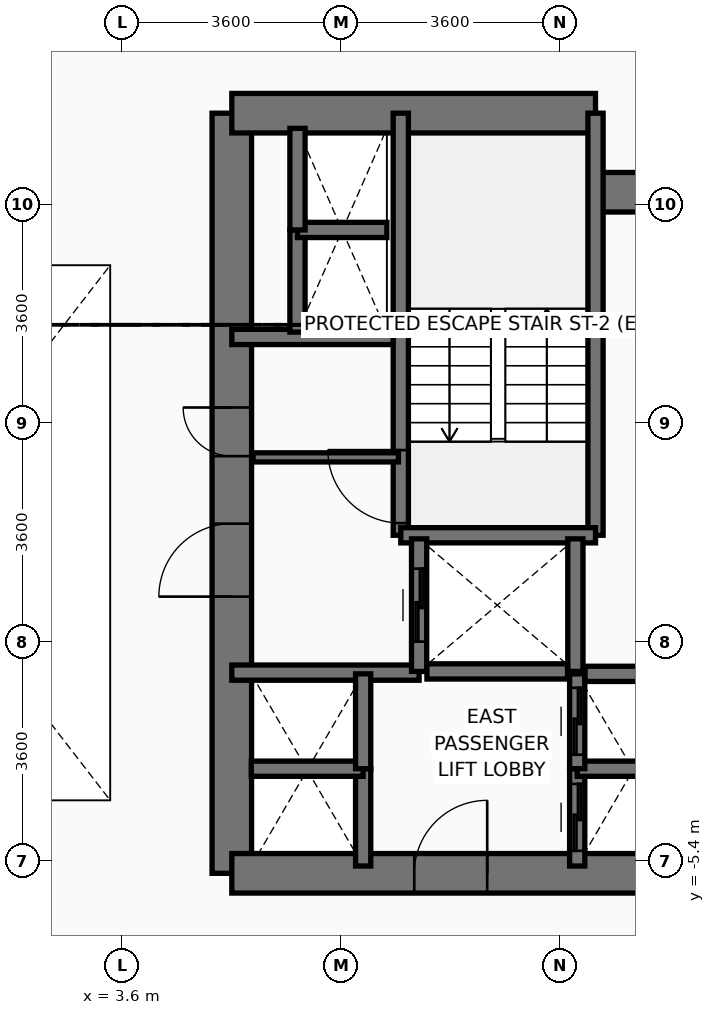
"""IFC4 building model, lengths in metres.
Left out: names, types, materials, properties, quantities, classifications, styles, units other than length and angle.
Written with IfcOpenShell. Run it as: python <this file> out.ifc"""

import sys

from ifc_helpers import new_model, si_unit, direction, frame, frame_2d, origin, place, context, subcontext, project, spatial, rectangle, extrude, source, transform, mapped, element, fill, save


model = new_model("IFC4")
c1 = context("Model", 3, precision=1e-05, world=origin(), true_north=direction((0.0, 1.0)))
c2 = subcontext(c1, "Body", "Model", "MODEL_VIEW")
j1 = project(units=[si_unit("LENGTHUNIT", "METRE"), si_unit("PLANEANGLEUNIT", "RADIAN")], contexts=[c1])
p1 = place(None, origin())
s1 = spatial("IfcSite", under=j1, at=p1, CompositionType="ELEMENT")
p2 = place(p1, origin())
s2 = spatial("IfcBuilding", under=s1, at=p2, CompositionType="ELEMENT")
p3 = place(p2, frame((0.0, 0.0, 10.2)))
s3 = spatial("IfcBuildingStorey", under=s2, at=p3, CompositionType="ELEMENT", Elevation=10.2)
p4 = place(p3, frame((5.4, -5.6, 0.0), z_axis=(0.0, 0.0, 1.0), x_axis=(0.0, 1.0, 0.0)))
e1 = element("IfcWall", 1, at=p4, inside=s3, PredefinedType="SHEAR", context=c2, shape_type="SweptSolid", body=[
    extrude(rectangle(XDim=12.5, YDim=0.65, at=frame_2d((6.25, 0.0))), origin(), (0.0, 0.0, 1.0), 5.15),
])
p5 = place(p4, frame((4.55, 0.0, 0.0)))
e2 = element("IfcOpeningElement", 2, at=p5, cuts=e1, PredefinedType="OPENING", context=c2, shape_type="SweptSolid", body=[
    extrude(rectangle(XDim=1.2, YDim=2.2, at=frame_2d((0.6, 1.1))), frame((0.0, 0.335, 0.0), z_axis=(0.0, -1.0, 0.0), x_axis=(1.0, 0.0, 0.0)), (0.0, 0.0, 1.0), 0.67),
])
p6 = place(p4, frame((6.86, 0.0, 0.0)))
e3 = element("IfcOpeningElement", 3, at=p6, cuts=e1, PredefinedType="OPENING", context=c2, shape_type="SweptSolid", body=[
    extrude(rectangle(XDim=0.8, YDim=2.1, at=frame_2d((0.4, 1.05))), frame((0.0, 0.335, 0.0), z_axis=(0.0, -1.0, 0.0), x_axis=(1.0, 0.0, 0.0)), (0.0, 0.0, 1.0), 0.67),
])
p7 = place(p3, frame((5.4, 6.9, 0.0), z_axis=(0.0, 0.0, 1.0), x_axis=(1.0, 0.0, 0.0)))
e4 = element("IfcWall", 4, at=p7, inside=s3, PredefinedType="SHEAR", context=c2, shape_type="SweptSolid", body=[
    extrude(rectangle(XDim=5.981, YDim=0.65, at=frame_2d((2.991, 0.0))), origin(), (0.0, 0.0, 1.0), 5.15),
])
p8 = place(p3, frame((11.381, 5.6, 0.0), z_axis=(0.0, 0.0, 1.0), x_axis=(1.0, 0.0, 0.0)))
e5 = element("IfcWall", 5, at=p8, inside=s3, PredefinedType="SHEAR", context=c2, shape_type="SweptSolid", body=[
    extrude(rectangle(XDim=1.819, YDim=0.65, at=frame_2d((0.909, 0.0))), origin(), (0.0, 0.0, 1.0), 5.15),
])
p9 = place(p3, frame((5.4, -5.6, 0.0), z_axis=(0.0, 0.0, 1.0), x_axis=(1.0, 0.0, 0.0)))
e6 = element("IfcWall", 6, at=p9, inside=s3, PredefinedType="SHEAR", context=c2, shape_type="SweptSolid", body=[
    extrude(rectangle(XDim=7.8, YDim=0.65, at=frame_2d((3.9, 0.0))), origin(), (0.0, 0.0, 1.0), 5.15),
])
p10 = place(p9, frame((3.0, 0.0, 0.0)))
e7 = element("IfcOpeningElement", 7, at=p10, cuts=e6, PredefinedType="OPENING", context=c2, shape_type="SweptSolid", body=[
    extrude(rectangle(XDim=1.2, YDim=2.2, at=frame_2d((0.6, 1.1))), frame((0.0, 0.335, 0.0), z_axis=(0.0, -1.0, 0.0), x_axis=(1.0, 0.0, 0.0)), (0.0, 0.0, 1.0), 0.67),
])
p11 = place(p3, frame((5.4, 3.22, 0.0), z_axis=(0.0, 0.0, 1.0), x_axis=(1.0, 0.0, 0.0)))
e8 = element("IfcWall", 8, at=p11, inside=s3, PredefinedType="SOLIDWALL", context=c2, shape_type="SweptSolid", body=[
    extrude(rectangle(XDim=2.78, YDim=0.25, at=frame_2d((1.39, 0.0))), origin(), (0.0, 0.0, 1.0), 5.15),
])
p12 = place(p3, frame((5.4, -2.3, 0.0), z_axis=(0.0, 0.0, 1.0), x_axis=(1.0, 0.0, 0.0)))
e9 = element("IfcWall", 9, at=p12, inside=s3, PredefinedType="SOLIDWALL", context=c2, shape_type="SweptSolid", body=[
    extrude(rectangle(XDim=3.08, YDim=0.25, at=frame_2d((1.54, 0.0))), origin(), (0.0, 0.0, 1.0), 5.15),
])
p13 = place(p3, frame((8.179, -0.041, 0.0), z_axis=(0.0, 0.0, 1.0), x_axis=(0.0, 1.0, 0.0)))
e10 = element("IfcWall", 10, at=p13, inside=s3, PredefinedType="SOLIDWALL", context=c2, shape_type="SweptSolid", body=[
    extrude(rectangle(XDim=6.941, YDim=0.25, at=frame_2d((3.47, 0.0))), origin(), (0.0, 0.0, 1.0), 5.15),
])
p14 = place(p13, frame((0.2, 0.0, 0.0)))
e11 = element("IfcOpeningElement", 11, at=p14, cuts=e10, PredefinedType="OPENING", context=c2, shape_type="SweptSolid", body=[
    extrude(rectangle(XDim=1.2, YDim=2.2, at=frame_2d((0.6, 1.1))), frame((0.0, 0.135, 0.0), z_axis=(0.0, -1.0, 0.0), x_axis=(1.0, 0.0, 0.0)), (0.0, 0.0, 1.0), 0.27),
])
p15 = place(p3, frame((11.381, -0.041, 0.0), z_axis=(0.0, 0.0, 1.0), x_axis=(0.0, 1.0, 0.0)))
e12 = element("IfcWall", 12, at=p15, inside=s3, PredefinedType="SOLIDWALL", context=c2, shape_type="SweptSolid", body=[
    extrude(rectangle(XDim=6.941, YDim=0.25, at=frame_2d((3.47, 0.0))), origin(), (0.0, 0.0, 1.0), 5.15),
])
p16 = place(p3, frame((8.179, -0.041, 0.0), z_axis=(0.0, 0.0, 1.0), x_axis=(1.0, 0.0, 0.0)))
e13 = element("IfcWall", 13, at=p16, inside=s3, PredefinedType="SOLIDWALL", context=c2, shape_type="SweptSolid", body=[
    extrude(rectangle(XDim=3.202, YDim=0.25, at=frame_2d((1.601, 0.0))), origin(), (0.0, 0.0, 1.0), 5.15),
])
p17 = place(p3, frame((8.48, -2.28, 0.0), z_axis=(0.0, 0.0, 1.0), x_axis=(0.0, 1.0, 0.0)))
e14 = element("IfcWall", 14, at=p17, inside=s3, PredefinedType="SOLIDWALL", context=c2, shape_type="SweptSolid", body=[
    extrude(rectangle(XDim=2.18, YDim=0.25, at=frame_2d((1.09, 0.0))), origin(), (0.0, 0.0, 1.0), 5.15),
])
p18 = place(p17, frame((0.49, 0.0, 0.0)))
e15 = element("IfcOpeningElement", 15, at=p18, cuts=e14, PredefinedType="OPENING", context=c2, shape_type="SweptSolid", body=[
    extrude(rectangle(XDim=1.2, YDim=2.2, at=frame_2d((0.6, 1.1))), frame((0.0, 0.135, 0.0), z_axis=(0.0, -1.0, 0.0), x_axis=(1.0, 0.0, 0.0)), (0.0, 0.0, 1.0), 0.27),
])
p19 = place(p3, frame((11.05, -2.28, 0.0), z_axis=(0.0, 0.0, 1.0), x_axis=(0.0, 1.0, 0.0)))
e16 = element("IfcWall", 16, at=p19, inside=s3, PredefinedType="SOLIDWALL", context=c2, shape_type="SweptSolid", body=[
    extrude(rectangle(XDim=2.18, YDim=0.25, at=frame_2d((1.09, 0.0))), origin(), (0.0, 0.0, 1.0), 5.15),
])
p20 = place(p3, frame((8.609, -2.28, 0.0), z_axis=(0.0, 0.0, 1.0), x_axis=(1.0, 0.0, 0.0)))
e17 = element("IfcWall", 17, at=p20, inside=s3, PredefinedType="SOLIDWALL", context=c2, shape_type="SweptSolid", body=[
    extrude(rectangle(XDim=2.312, YDim=0.25, at=frame_2d((1.156, 0.0))), origin(), (0.0, 0.0, 1.0), 5.15),
])
p21 = place(p3, frame((11.08, -5.48, 0.0), z_axis=(0.0, 0.0, 1.0), x_axis=(0.0, 1.0, 0.0)))
e18 = element("IfcWall", 18, at=p21, inside=s3, PredefinedType="SOLIDWALL", context=c2, shape_type="SweptSolid", body=[
    extrude(rectangle(XDim=1.6, YDim=0.25, at=frame_2d((0.8, 0.0))), origin(), (0.0, 0.0, 1.0), 5.15),
])
p22 = place(p21, frame((0.25, 0.0, 0.0)))
e19 = element("IfcOpeningElement", 19, at=p22, cuts=e18, PredefinedType="OPENING", context=c2, shape_type="SweptSolid", body=[
    extrude(rectangle(XDim=1.1, YDim=2.2, at=frame_2d((0.55, 1.1))), frame((0.0, 0.135, 0.0), z_axis=(0.0, -1.0, 0.0), x_axis=(1.0, 0.0, 0.0)), (0.0, 0.0, 1.0), 0.27),
])
p23 = place(p3, frame((11.08, -3.88, 0.0), z_axis=(0.0, 0.0, 1.0), x_axis=(1.0, 0.0, 0.0)))
e20 = element("IfcWall", 20, at=p23, inside=s3, PredefinedType="SOLIDWALL", context=c2, shape_type="SweptSolid", body=[
    extrude(rectangle(XDim=1.84, YDim=0.25, at=frame_2d((0.92, 0.0))), origin(), (0.0, 0.0, 1.0), 5.15),
])
p24 = place(p3, frame((11.08, -3.88, 0.0), z_axis=(0.0, 0.0, 1.0), x_axis=(0.0, 1.0, 0.0)))
e21 = element("IfcWall", 21, at=p24, inside=s3, PredefinedType="SOLIDWALL", context=c2, shape_type="SweptSolid", body=[
    extrude(rectangle(XDim=1.56, YDim=0.25, at=frame_2d((0.78, 0.0))), origin(), (0.0, 0.0, 1.0), 5.15),
])
p25 = place(p24, frame((0.23, 0.0, 0.0)))
e22 = element("IfcOpeningElement", 22, at=p25, cuts=e21, PredefinedType="OPENING", context=c2, shape_type="SweptSolid", body=[
    extrude(rectangle(XDim=1.1, YDim=2.2, at=frame_2d((0.55, 1.1))), frame((0.0, 0.135, 0.0), z_axis=(0.0, -1.0, 0.0), x_axis=(1.0, 0.0, 0.0)), (0.0, 0.0, 1.0), 0.27),
])
p26 = place(p3, frame((11.209, -2.32, 0.0), z_axis=(0.0, 0.0, 1.0), x_axis=(1.0, 0.0, 0.0)))
e23 = element("IfcWall", 23, at=p26, inside=s3, PredefinedType="SOLIDWALL", context=c2, shape_type="SweptSolid", body=[
    extrude(rectangle(XDim=1.582, YDim=0.25, at=frame_2d((0.791, 0.0))), origin(), (0.0, 0.0, 1.0), 5.15),
])
p27 = place(p3, frame((7.56, -5.48, 0.0), z_axis=(0.0, 0.0, 1.0), x_axis=(0.0, 1.0, 0.0)))
e24 = element("IfcWall", 24, at=p27, inside=s3, PredefinedType="SOLIDWALL", context=c2, shape_type="SweptSolid", body=[
    extrude(rectangle(XDim=1.6, YDim=0.25, at=frame_2d((0.8, 0.0))), origin(), (0.0, 0.0, 1.0), 5.15),
])
p28 = place(p3, frame((5.72, -3.88, 0.0), z_axis=(0.0, 0.0, 1.0), x_axis=(1.0, 0.0, 0.0)))
e25 = element("IfcWall", 25, at=p28, inside=s3, PredefinedType="SOLIDWALL", context=c2, shape_type="SweptSolid", body=[
    extrude(rectangle(XDim=1.84, YDim=0.25, at=frame_2d((0.92, 0.0))), origin(), (0.0, 0.0, 1.0), 5.15),
])
p29 = place(p3, frame((7.56, -3.88, 0.0), z_axis=(0.0, 0.0, 1.0), x_axis=(0.0, 1.0, 0.0)))
e26 = element("IfcWall", 26, at=p29, inside=s3, PredefinedType="SOLIDWALL", context=c2, shape_type="SweptSolid", body=[
    extrude(rectangle(XDim=1.56, YDim=0.25, at=frame_2d((0.78, 0.0))), origin(), (0.0, 0.0, 1.0), 5.15),
])
p30 = place(p3, frame((6.48, 3.3, 0.0), z_axis=(0.0, 0.0, 1.0), x_axis=(0.0, 1.0, 0.0)))
e27 = element("IfcWall", 27, at=p30, inside=s3, PredefinedType="SOLIDWALL", context=c2, shape_type="SweptSolid", body=[
    extrude(rectangle(XDim=1.68, YDim=0.25, at=frame_2d((0.84, 0.0))), origin(), (0.0, 0.0, 1.0), 5.15),
])
p31 = place(p3, frame((6.48, 4.98, 0.0), z_axis=(0.0, 0.0, 1.0), x_axis=(1.0, 0.0, 0.0)))
e28 = element("IfcWall", 28, at=p31, inside=s3, PredefinedType="SOLIDWALL", context=c2, shape_type="SweptSolid", body=[
    extrude(rectangle(XDim=1.47, YDim=0.25, at=frame_2d((0.735, 0.0))), origin(), (0.0, 0.0, 1.0), 5.15),
])
p32 = place(p3, frame((6.48, 4.98, 0.0), z_axis=(0.0, 0.0, 1.0), x_axis=(0.0, 1.0, 0.0)))
e29 = element("IfcWall", 29, at=p32, inside=s3, PredefinedType="SOLIDWALL", context=c2, shape_type="SweptSolid", body=[
    extrude(rectangle(XDim=1.67, YDim=0.25, at=frame_2d((0.835, 0.0))), origin(), (0.0, 0.0, 1.0), 5.15),
])
p33 = place(p3, frame((5.75, 1.24, 0.0), z_axis=(0.0, 0.0, 1.0), x_axis=(1.0, 0.0, 0.0)))
e30 = element("IfcWall", 30, at=p33, inside=s3, PredefinedType="PARTITIONING", context=c2, shape_type="SweptSolid", body=[
    extrude(rectangle(XDim=2.39, YDim=0.15, at=frame_2d((1.195, 0.0))), origin(), (0.0, 0.0, 1.0), 4.25),
])
m1 = source(origin(), c2, "Body", "SweptSolid", [
    extrude(rectangle(XDim=1.2, YDim=2.2, at=frame_2d((0.6, 1.1))), frame((0.0, 0.025, 0.0), z_axis=(0.0, -1.0, 0.0), x_axis=(1.0, 0.0, 0.0)), (0.0, 0.0, 1.0), 0.05),
])
p34 = place(p14, origin())
e31 = element("IfcDoor", 31, at=p34, inside=s3, OperationType="SINGLE_SWING_RIGHT", PredefinedType="DOOR", context=c2, shape_type="MappedRepresentation", body=[
    mapped(m1, transform((0.0, 0.0, 0.0), x_axis=(1.0, 0.0, 0.0), y_axis=(0.0, 1.0, 0.0), z_axis=(0.0, 0.0, 1.0), scale=1.0)),
])
fill(e11, e31)
p35 = place(p5, origin())
e32 = element("IfcDoor", 32, at=p35, inside=s3, OperationType="SINGLE_SWING_LEFT", PredefinedType="DOOR", context=c2, shape_type="MappedRepresentation", body=[
    mapped(m1, transform((0.0, 0.0, 0.0), x_axis=(1.0, 0.0, 0.0), y_axis=(0.0, 1.0, 0.0), z_axis=(0.0, 0.0, 1.0), scale=1.0)),
])
fill(e2, e32)
p36 = place(p10, origin())
e33 = element("IfcDoor", 33, at=p36, inside=s3, OperationType="SINGLE_SWING_RIGHT", PredefinedType="DOOR", context=c2, shape_type="MappedRepresentation", body=[
    mapped(m1, transform((0.0, 0.0, 0.0), x_axis=(1.0, 0.0, 0.0), y_axis=(0.0, 1.0, 0.0), z_axis=(0.0, 0.0, 1.0), scale=1.0)),
])
fill(e7, e33)
m2 = source(origin(), c2, "Body", "SweptSolid", [
    extrude(rectangle(XDim=0.8, YDim=2.1, at=frame_2d((0.4, 1.05))), frame((0.0, 0.025, 0.0), z_axis=(0.0, -1.0, 0.0), x_axis=(1.0, 0.0, 0.0)), (0.0, 0.0, 1.0), 0.05),
])
p37 = place(p6, origin())
e34 = element("IfcDoor", 34, at=p37, inside=s3, OperationType="SINGLE_SWING_RIGHT", PredefinedType="DOOR", context=c2, shape_type="MappedRepresentation", body=[
    mapped(m2, transform((0.0, 0.0, 0.0), x_axis=(1.0, 0.0, 0.0), y_axis=(0.0, 1.0, 0.0), z_axis=(0.0, 0.0, 1.0), scale=1.0)),
])
fill(e3, e34)
p38 = place(p18, origin())
e35 = element("IfcDoor", 35, at=p38, inside=s3, OperationType="SLIDING_TO_RIGHT", PredefinedType="DOOR", context=c2, shape_type="MappedRepresentation", body=[
    mapped(m1, transform((0.0, 0.0, 0.0), x_axis=(1.0, 0.0, 0.0), y_axis=(0.0, 1.0, 0.0), z_axis=(0.0, 0.0, 1.0), scale=1.0)),
])
fill(e15, e35)
m3 = source(origin(), c2, "Body", "SweptSolid", [
    extrude(rectangle(XDim=1.1, YDim=2.2, at=frame_2d((0.55, 1.1))), frame((0.0, 0.025, 0.0), z_axis=(0.0, -1.0, 0.0), x_axis=(1.0, 0.0, 0.0)), (0.0, 0.0, 1.0), 0.05),
])
p39 = place(p22, origin())
e36 = element("IfcDoor", 36, at=p39, inside=s3, OperationType="SLIDING_TO_LEFT", PredefinedType="DOOR", context=c2, shape_type="MappedRepresentation", body=[
    mapped(m3, transform((0.0, 0.0, 0.0), x_axis=(1.0, 0.0, 0.0), y_axis=(0.0, 1.0, 0.0), z_axis=(0.0, 0.0, 1.0), scale=1.0)),
])
fill(e19, e36)
p40 = place(p25, origin())
e37 = element("IfcDoor", 37, at=p40, inside=s3, OperationType="SLIDING_TO_LEFT", PredefinedType="DOOR", context=c2, shape_type="MappedRepresentation", body=[
    mapped(m3, transform((0.0, 0.0, 0.0), x_axis=(1.0, 0.0, 0.0), y_axis=(0.0, 1.0, 0.0), z_axis=(0.0, 0.0, 1.0), scale=1.0)),
])
fill(e22, e37)
save(model, sys.argv[1])
